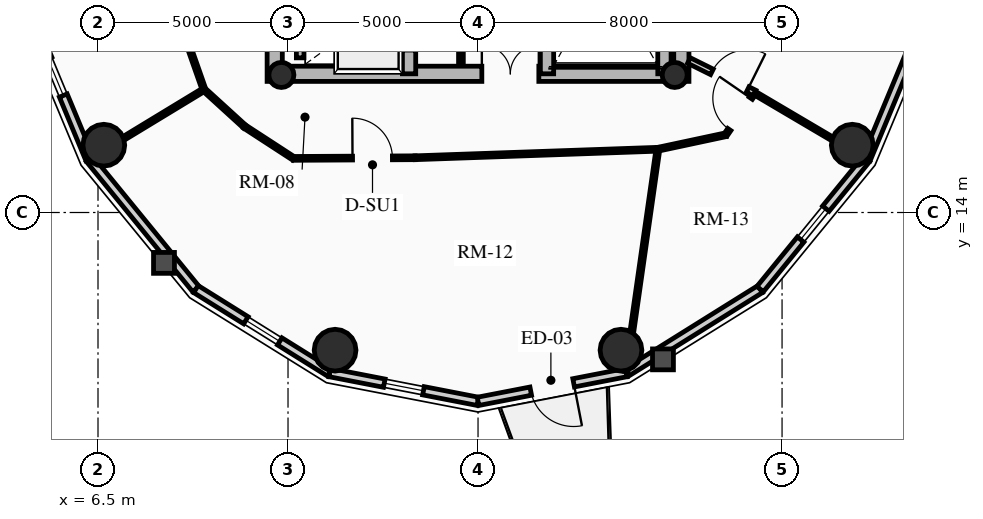
"""IFC4 building model, lengths in metres.
Left out: names, types, materials, properties, quantities, classifications, styles, units other than length and angle.
Written with IfcOpenShell. Run it as: python <this file> out.ifc"""

import sys

from ifc_helpers import new_model, si_unit, direction, frame, frame_2d, origin, origin_2d, place, context, subcontext, project, spatial, rectangle, circle, hollow_circle, extrude, source, transform, mapped, element, fill, save


model = new_model("IFC4")
c1 = context("Model", 3, precision=1e-05, world=origin(), true_north=direction((0.0, 1.0)))
c2 = subcontext(c1, "Body", "Model", "MODEL_VIEW")
j1 = project(units=[si_unit("LENGTHUNIT", "METRE"), si_unit("PLANEANGLEUNIT", "RADIAN")], contexts=[c1])
p1 = place(None, origin())
s1 = spatial("IfcSite", under=j1, at=p1, CompositionType="ELEMENT")
p2 = place(p1, origin())
s2 = spatial("IfcBuilding", under=s1, at=p2, CompositionType="ELEMENT")
p3 = place(p2, frame((0.0, 0.0, 199.57)))
s3 = spatial("IfcBuildingStorey", under=s2, at=p3, CompositionType="ELEMENT", Elevation=199.57)
for number, where, z_axis, x_axis in (
    (1, (11.15, 17.45, 0.0), (0.0, 0.0, 1.0), (0.0, 1.0, 0.0)),
    (2, (21.85, 17.45, 0.0), (0.0, 0.0, 1.0), (0.0, 1.0, 0.0)),
):
    element("IfcWall", number, at=place(p3, frame(where, z_axis=z_axis, x_axis=x_axis)), inside=s3, PredefinedType="SHEAR", context=c2, shape_type="SweptSolid", body=[
        extrude(rectangle(XDim=14.1, YDim=0.4, at=frame_2d((7.05, 0.0))), origin(), (0.0, 0.0, 1.0), 2.91),
    ])
p4 = place(p3, frame((11.15, 17.65, 0.0), z_axis=(0.0, 0.0, 1.0), x_axis=(1.0, 0.0, 0.0)))
e3 = element("IfcWall", 3, at=p4, inside=s3, PredefinedType="SHEAR", context=c2, shape_type="SweptSolid", body=[
    extrude(rectangle(XDim=10.7, YDim=0.4, at=frame_2d((5.35, 0.0))), origin(), (0.0, 0.0, 1.0), 2.91),
])
m1 = source(origin(), c2, "Body", "SweptSolid", [
    extrude(rectangle(XDim=1.5, YDim=2.02, at=frame_2d((0.75, 1.01))), frame((0.0, 0.21, 0.0), z_axis=(0.0, -1.0, 0.0), x_axis=(1.0, 0.0, 0.0)), (0.0, 0.0, 1.0), 0.42),
])
p5 = place(p4, frame((5.45, 0.0, 0.0)))
e4 = element("IfcOpeningElement", 4, at=p5, cuts=e3, PredefinedType="OPENING", context=c2, shape_type="MappedRepresentation", body=[
    mapped(m1, transform((0.0, 0.0, 0.0), x_axis=(1.0, 0.0, 0.0), y_axis=(0.0, 1.0, 0.0), z_axis=(0.0, 0.0, 1.0), scale=1.0)),
])
p6 = place(p3, frame((14.685, 17.65, 0.0), z_axis=(0.0, 0.0, 1.0), x_axis=(0.0, 1.0, 0.0)))
e5 = element("IfcWall", 5, at=p6, inside=s3, PredefinedType="SHEAR", context=c2, shape_type="SweptSolid", body=[
    extrude(rectangle(XDim=13.7, YDim=0.35, at=frame_2d((6.85, 0.0))), origin(), (0.0, 0.0, 1.0), 2.91),
])
m2 = source(origin(), c2, "Body", "SweptSolid", [
    extrude(rectangle(XDim=1.1, YDim=2.015, at=frame_2d((0.55, 1.007))), frame((0.0, 0.185, 0.0), z_axis=(0.0, -1.0, 0.0), x_axis=(1.0, 0.0, 0.0)), (0.0, 0.0, 1.0), 0.37),
])
p7 = place(p6, frame((4.85, 0.0, 0.0)))
e6 = element("IfcOpeningElement", 6, at=p7, cuts=e5, PredefinedType="OPENING", context=c2, shape_type="MappedRepresentation", body=[
    mapped(m2, transform((0.0, 0.0, 0.0), x_axis=(1.0, 0.0, 0.0), y_axis=(0.0, 1.0, 0.0), z_axis=(0.0, 0.0, 1.0), scale=1.0)),
])
p8 = place(p6, frame((0.625, 0.0, 0.0)))
e7 = element("IfcOpeningElement", 7, at=p8, cuts=e5, PredefinedType="OPENING", context=c2, shape_type="MappedRepresentation", body=[
    mapped(m2, transform((0.0, 0.0, 0.0), x_axis=(1.0, 0.0, 0.0), y_axis=(0.0, 1.0, 0.0), z_axis=(0.0, 0.0, 1.0), scale=1.0)),
])
p9 = place(p6, frame((2.625, 0.0, 0.0)))
e8 = element("IfcOpeningElement", 8, at=p9, cuts=e5, PredefinedType="OPENING", context=c2, shape_type="MappedRepresentation", body=[
    mapped(m2, transform((0.0, 0.0, 0.0), x_axis=(1.0, 0.0, 0.0), y_axis=(0.0, 1.0, 0.0), z_axis=(0.0, 0.0, 1.0), scale=1.0)),
])
m3 = source(origin(), c2, "Body", "SweptSolid", [
    extrude(rectangle(XDim=1.15, YDim=2.02, at=frame_2d((0.575, 1.01))), frame((0.0, 0.185, 0.0), z_axis=(0.0, -1.0, 0.0), x_axis=(1.0, 0.0, 0.0)), (0.0, 0.0, 1.0), 0.37),
])
p10 = place(p6, frame((7.27, 0.0, 0.0)))
e9 = element("IfcOpeningElement", 9, at=p10, cuts=e5, PredefinedType="OPENING", context=c2, shape_type="MappedRepresentation", body=[
    mapped(m3, transform((0.0, 0.0, 0.0), x_axis=(1.0, 0.0, 0.0), y_axis=(0.0, 1.0, 0.0), z_axis=(0.0, 0.0, 1.0), scale=1.0)),
])
p11 = place(p3, frame((18.315, 17.65, 0.0), z_axis=(0.0, 0.0, 1.0), x_axis=(0.0, 1.0, 0.0)))
e10 = element("IfcWall", 10, at=p11, inside=s3, PredefinedType="SHEAR", context=c2, shape_type="SweptSolid", body=[
    extrude(rectangle(XDim=9.6, YDim=0.35, at=frame_2d((4.8, 0.0))), origin(), (0.0, 0.0, 1.0), 2.91),
])
p12 = place(p11, frame((5.28, 0.0, 0.0)))
e11 = element("IfcOpeningElement", 11, at=p12, cuts=e10, PredefinedType="OPENING", context=c2, shape_type="MappedRepresentation", body=[
    mapped(m3, transform((0.0, 0.0, 0.0), x_axis=(1.0, 0.0, 0.0), y_axis=(0.0, 1.0, 0.0), z_axis=(0.0, 0.0, 1.0), scale=1.0)),
])
p13 = place(p3, frame((21.405, 17.65, 0.0), z_axis=(0.0, 0.0, 1.0), x_axis=(0.0, 1.0, 0.0)))
e12 = element("IfcWall", 12, at=p13, inside=s3, PredefinedType="SHEAR", context=c2, shape_type="SweptSolid", body=[
    extrude(rectangle(XDim=6.695, YDim=0.35, at=frame_2d((3.348, 0.0))), origin(), (0.0, 0.0, 1.0), 2.91),
])
for number, where, z_axis, x_axis in (
    (13, (11.325, 17.62, 0.0), (0.0, 0.0, 1.0), (1.0, 0.0, 0.0)),
    (14, (21.675, 17.62, 0.0), (0.0, 0.0, 1.0), (1.0, 0.0, 0.0)),
):
    element("IfcColumn", number, at=place(p3, frame(where, z_axis=z_axis, x_axis=x_axis)), inside=s3, PredefinedType="COLUMN", context=c2, shape_type="SweptSolid", body=[
        extrude(hollow_circle(Radius=0.33, WallThickness=0.025, at=origin_2d()), origin(), (0.0, 0.0, 1.0), 2.91),
    ])
for number, where, z_axis, x_axis in (
    (15, (6.653, 15.771, 0.0), (0.0, 0.0, 1.0), (1.0, 0.0, 0.0)),
    (16, (12.739, 10.377, 0.0), (0.0, 0.0, 1.0), (1.0, 0.0, 0.0)),
    (17, (20.261, 10.377, 0.0), (0.0, 0.0, 1.0), (1.0, 0.0, 0.0)),
    (18, (26.347, 15.771, 0.0), (0.0, 0.0, 1.0), (1.0, 0.0, 0.0)),
):
    element("IfcColumn", number, at=place(p3, frame(where, z_axis=z_axis, x_axis=x_axis)), inside=s3, PredefinedType="USERDEFINED", context=c2, shape_type="SweptSolid", body=[
        extrude(circle(Radius=0.55, at=origin_2d()), origin(), (0.0, 0.0, 1.0), 2.91),
    ])
p14 = place(p3, frame((6.282, 15.407, 0.0), z_axis=(0.0, 0.0, 1.0), x_axis=(-0.384036305194, 0.923317993052, 0.0)))
e19 = element("IfcWall", 19, at=p14, inside=s3, PredefinedType="SOLIDWALL", context=c2, shape_type="SweptSolid", body=[
    extrude(rectangle(XDim=4.671, YDim=0.22, at=frame_2d((2.335, 0.0))), origin(), (0.0, 0.0, 1.0), 2.322),
])
m4 = source(origin(), c2, "Body", "SweptSolid", [
    extrude(rectangle(XDim=1.05, YDim=1.3, at=frame_2d((0.525, 0.65))), frame((0.0, 0.12, 0.0), z_axis=(0.0, -1.0, 0.0), x_axis=(1.0, 0.0, 0.0)), (0.0, 0.0, 1.0), 0.24),
])
p15 = place(p14, frame((1.81, 0.0, 0.65)))
e20 = element("IfcOpeningElement", 20, at=p15, cuts=e19, PredefinedType="OPENING", context=c2, shape_type="MappedRepresentation", body=[
    mapped(m4, transform((0.0, 0.0, 0.0), x_axis=(1.0, 0.0, 0.0), y_axis=(0.0, 1.0, 0.0), z_axis=(0.0, 0.0, 1.0), scale=1.0)),
])
p16 = place(p3, frame((9.076, 11.985, 0.0), z_axis=(0.0, 0.0, 1.0), x_axis=(-0.632467166636, 0.774587169483, 0.0)))
e21 = element("IfcWall", 21, at=p16, inside=s3, PredefinedType="SOLIDWALL", context=c2, shape_type="SweptSolid", body=[
    extrude(rectangle(XDim=4.418, YDim=0.22, at=frame_2d((2.209, 0.0))), origin(), (0.0, 0.0, 1.0), 2.322),
])
p17 = place(p3, frame((12.597, 9.787, 0.0), z_axis=(0.0, 0.0, 1.0), x_axis=(-0.848318713376, 0.529485939886, 0.0)))
e22 = element("IfcWall", 22, at=p17, inside=s3, PredefinedType="SOLIDWALL", context=c2, shape_type="SweptSolid", body=[
    extrude(rectangle(XDim=4.15, YDim=0.22, at=frame_2d((2.075, 0.0))), origin(), (0.0, 0.0, 1.0), 2.322),
])
p18 = place(p17, frame((1.55, 0.0, 0.65)))
e23 = element("IfcOpeningElement", 23, at=p18, cuts=e22, PredefinedType="OPENING", context=c2, shape_type="MappedRepresentation", body=[
    mapped(m4, transform((0.0, 0.0, 0.0), x_axis=(1.0, 0.0, 0.0), y_axis=(0.0, 1.0, 0.0), z_axis=(0.0, 0.0, 1.0), scale=1.0)),
])
p19 = place(p3, frame((16.5, 9.03, 0.0), z_axis=(0.0, 0.0, 1.0), x_axis=(-0.981700307484, 0.190432419211, 0.0)))
e24 = element("IfcWall", 24, at=p19, inside=s3, PredefinedType="SOLIDWALL", context=c2, shape_type="SweptSolid", body=[
    extrude(rectangle(XDim=3.976, YDim=0.22, at=frame_2d((1.988, 0.0))), origin(), (0.0, 0.0, 1.0), 2.322),
])
p20 = place(p19, frame((1.463, 0.0, 0.65)))
e25 = element("IfcOpeningElement", 25, at=p20, cuts=e24, PredefinedType="OPENING", context=c2, shape_type="MappedRepresentation", body=[
    mapped(m4, transform((0.0, 0.0, 0.0), x_axis=(1.0, 0.0, 0.0), y_axis=(0.0, 1.0, 0.0), z_axis=(0.0, 0.0, 1.0), scale=1.0)),
])
p21 = place(p3, frame((20.403, 9.787, 0.0), z_axis=(0.0, 0.0, 1.0), x_axis=(-0.981700307484, -0.190432419211, 0.0)))
e26 = element("IfcWall", 26, at=p21, inside=s3, PredefinedType="SOLIDWALL", context=c2, shape_type="SweptSolid", body=[
    extrude(rectangle(XDim=3.976, YDim=0.22, at=frame_2d((1.988, 0.0))), origin(), (0.0, 0.0, 1.0), 2.322),
])
m5 = source(origin(), c2, "Body", "SweptSolid", [
    extrude(rectangle(XDim=1.15, YDim=2.005, at=frame_2d((0.575, 1.002))), frame((0.0, 0.12, 0.0), z_axis=(0.0, -1.0, 0.0), x_axis=(1.0, 0.0, 0.0)), (0.0, 0.0, 1.0), 0.24),
])
p22 = place(p21, frame((1.413, 0.0, 0.0)))
e27 = element("IfcOpeningElement", 27, at=p22, cuts=e26, PredefinedType="OPENING", context=c2, shape_type="MappedRepresentation", body=[
    mapped(m5, transform((0.0, 0.0, 0.0), x_axis=(1.0, 0.0, 0.0), y_axis=(0.0, 1.0, 0.0), z_axis=(0.0, 0.0, 1.0), scale=1.0)),
])
p23 = place(p3, frame((23.924, 11.985, 0.0), z_axis=(0.0, 0.0, 1.0), x_axis=(-0.848318713376, -0.529485939886, 0.0)))
e28 = element("IfcWall", 28, at=p23, inside=s3, PredefinedType="SOLIDWALL", context=c2, shape_type="SweptSolid", body=[
    extrude(rectangle(XDim=4.15, YDim=0.22, at=frame_2d((2.075, 0.0))), origin(), (0.0, 0.0, 1.0), 2.322),
])
p24 = place(p3, frame((26.718, 15.407, 0.0), z_axis=(0.0, 0.0, 1.0), x_axis=(-0.632467166636, -0.774587169483, 0.0)))
e29 = element("IfcWall", 29, at=p24, inside=s3, PredefinedType="SOLIDWALL", context=c2, shape_type="SweptSolid", body=[
    extrude(rectangle(XDim=4.418, YDim=0.22, at=frame_2d((2.209, 0.0))), origin(), (0.0, 0.0, 1.0), 2.322),
])
p25 = place(p24, frame((1.684, 0.0, 0.65)))
e30 = element("IfcOpeningElement", 30, at=p25, cuts=e29, PredefinedType="OPENING", context=c2, shape_type="MappedRepresentation", body=[
    mapped(m4, transform((0.0, 0.0, 0.0), x_axis=(1.0, 0.0, 0.0), y_axis=(0.0, 1.0, 0.0), z_axis=(0.0, 0.0, 1.0), scale=1.0)),
])
p26 = place(p3, frame((28.512, 19.719, 0.0), z_axis=(0.0, 0.0, 1.0), x_axis=(-0.384036305194, -0.923317993052, 0.0)))
e31 = element("IfcWall", 31, at=p26, inside=s3, PredefinedType="SOLIDWALL", context=c2, shape_type="SweptSolid", body=[
    extrude(rectangle(XDim=4.671, YDim=0.22, at=frame_2d((2.335, 0.0))), origin(), (0.0, 0.0, 1.0), 2.322),
])
p27 = place(p3, frame((11.82, 18.07, 0.0), z_axis=(0.0, 0.0, 1.0), x_axis=(0.0, 1.0, 0.0)))
e32 = element("IfcWall", 32, at=p27, inside=s3, PredefinedType="SHEAR", context=c2, shape_type="SweptSolid", body=[
    extrude(rectangle(XDim=1.635, YDim=0.2, at=frame_2d((0.817, 0.0))), origin(), (0.0, 0.0, 1.0), 2.91),
])
p28 = place(p3, frame((16.05, 17.92, 0.0), z_axis=(0.0, 0.0, 1.0), x_axis=(0.0, 1.0, 0.0)))
e33 = element("IfcWall", 33, at=p28, inside=s3, PredefinedType="PARTITIONING", context=c2, shape_type="SweptSolid", body=[
    extrude(rectangle(XDim=1.8, YDim=0.125, at=frame_2d((0.9, 0.0))), origin(), (0.0, 0.0, 1.0), 2.685),
])
m6 = source(origin(), c2, "Body", "SweptSolid", [
    extrude(rectangle(XDim=0.9, YDim=2.005, at=frame_2d((0.45, 1.002))), frame((0.0, 0.073, 0.0), z_axis=(0.0, -1.0, 0.0), x_axis=(1.0, 0.0, 0.0)), (0.0, 0.0, 1.0), 0.145),
])
p29 = place(p28, frame((0.42, 0.0, 0.0)))
e34 = element("IfcOpeningElement", 34, at=p29, cuts=e33, PredefinedType="OPENING", context=c2, shape_type="MappedRepresentation", body=[
    mapped(m6, transform((0.0, 0.0, 0.0), x_axis=(1.0, 0.0, 0.0), y_axis=(0.0, 1.0, 0.0), z_axis=(0.0, 0.0, 1.0), scale=1.0)),
])
p30 = place(p3, frame((8.832, 18.534, 0.0), z_axis=(0.0, 0.0, 1.0), x_axis=(0.332031819657, -0.943268186008, 0.0)))
e35 = element("IfcWall", 35, at=p30, inside=s3, PredefinedType="MOVABLE", context=c2, shape_type="SweptSolid", body=[
    extrude(rectangle(XDim=1.377, YDim=0.1, at=frame_2d((0.688, 0.0))), origin(), (0.0, 0.0, 1.0), 2.255),
])
p31 = place(p3, frame((9.289, 17.235, 0.0), z_axis=(0.0, 0.0, 1.0), x_axis=(0.739015164946, -0.673688790155, 0.0)))
e36 = element("IfcWall", 36, at=p31, inside=s3, PredefinedType="MOVABLE", context=c2, shape_type="SweptSolid", body=[
    extrude(rectangle(XDim=1.446, YDim=0.1, at=frame_2d((0.723, 0.0))), origin(), (0.0, 0.0, 1.0), 2.322),
])
p32 = place(p3, frame((10.358, 16.26, 0.0), z_axis=(0.0, 0.0, 1.0), x_axis=(0.838265397059, -0.545262435983, 0.0)))
e37 = element("IfcWall", 37, at=p32, inside=s3, PredefinedType="MOVABLE", context=c2, shape_type="SweptSolid", body=[
    extrude(rectangle(XDim=1.534, YDim=0.1, at=frame_2d((0.767, 0.0))), origin(), (0.0, 0.0, 1.0), 2.255),
])
p33 = place(p3, frame((11.644, 15.424, 0.0), z_axis=(0.0, 0.0, 1.0), x_axis=(0.999986552511, 0.005186019339, 0.0)))
e38 = element("IfcWall", 38, at=p33, inside=s3, PredefinedType="MOVABLE", context=c2, shape_type="SweptSolid", body=[
    extrude(rectangle(XDim=3.201, YDim=0.1, at=frame_2d((1.601, 0.0))), origin(), (0.0, 0.0, 1.0), 2.322),
])
m7 = source(origin(), c2, "Body", "SweptSolid", [
    extrude(rectangle(XDim=1.05, YDim=2.015, at=frame_2d((0.525, 1.007))), frame((0.0, 0.06, 0.0), z_axis=(0.0, -1.0, 0.0), x_axis=(1.0, 0.0, 0.0)), (0.0, 0.0, 1.0), 0.12),
])
p34 = place(p33, frame((1.553, 0.0, 0.0)))
e39 = element("IfcOpeningElement", 39, at=p34, cuts=e38, PredefinedType="OPENING", context=c2, shape_type="MappedRepresentation", body=[
    mapped(m7, transform((0.0, 0.0, 0.0), x_axis=(1.0, 0.0, 0.0), y_axis=(0.0, 1.0, 0.0), z_axis=(0.0, 0.0, 1.0), scale=1.0)),
])
p35 = place(p3, frame((14.845, 15.441, 0.0), z_axis=(0.0, 0.0, 1.0), x_axis=(0.99938794868, 0.034981824334, 0.0)))
e40 = element("IfcWall", 40, at=p35, inside=s3, PredefinedType="MOVABLE", context=c2, shape_type="SweptSolid", body=[
    extrude(rectangle(XDim=6.393, YDim=0.1, at=frame_2d((3.196, 0.0))), origin(), (0.0, 0.0, 1.0), 2.255),
])
p36 = place(p3, frame((21.234, 15.664, 0.0), z_axis=(0.0, 0.0, 1.0), x_axis=(0.977931581182, 0.208925399431, 0.0)))
e41 = element("IfcWall", 41, at=p36, inside=s3, PredefinedType="MOVABLE", context=c2, shape_type="SweptSolid", body=[
    extrude(rectangle(XDim=1.823, YDim=0.1, at=frame_2d((0.912, 0.0))), origin(), (0.0, 0.0, 1.0), 2.255),
])
p37 = place(p3, frame((23.017, 16.045, 0.0), z_axis=(0.0, 0.0, 1.0), x_axis=(0.566660656138, 0.823951273308, 0.0)))
e42 = element("IfcWall", 42, at=p37, inside=s3, PredefinedType="MOVABLE", context=c2, shape_type="SweptSolid", body=[
    extrude(rectangle(XDim=1.336, YDim=0.1, at=frame_2d((0.668, 0.0))), origin(), (0.0, 0.0, 1.0), 2.322),
])
m8 = source(origin(), c2, "Body", "SweptSolid", [
    extrude(rectangle(XDim=1.0, YDim=2.015, at=frame_2d((0.5, 1.007))), frame((0.0, 0.06, 0.0), z_axis=(0.0, -1.0, 0.0), x_axis=(1.0, 0.0, 0.0)), (0.0, 0.0, 1.0), 0.12),
])
p38 = place(p37, frame((0.168, 0.0, 0.0)))
e43 = element("IfcOpeningElement", 43, at=p38, cuts=e42, PredefinedType="OPENING", context=c2, shape_type="MappedRepresentation", body=[
    mapped(m8, transform((0.0, 0.0, 0.0), x_axis=(1.0, 0.0, 0.0), y_axis=(0.0, 1.0, 0.0), z_axis=(0.0, 0.0, 1.0), scale=1.0)),
])
p39 = place(p3, frame((9.289, 17.235, 0.0), z_axis=(0.0, 0.0, 1.0), x_axis=(-0.854741081983, -0.519054604806, 0.0)))
e44 = element("IfcWall", 44, at=p39, inside=s3, PredefinedType="MOVABLE", context=c2, shape_type="SweptSolid", body=[
    extrude(rectangle(XDim=3.499, YDim=0.1, at=frame_2d((1.75, 0.0))), origin(), (0.0, 0.0, 1.0), 2.322),
])
p40 = place(p3, frame((21.234, 15.664, 0.0), z_axis=(0.0, 0.0, 1.0), x_axis=(-0.141467563045, -0.989942891588, 0.0)))
e45 = element("IfcWall", 45, at=p40, inside=s3, PredefinedType="MOVABLE", context=c2, shape_type="SweptSolid", body=[
    extrude(rectangle(XDim=5.918, YDim=0.1, at=frame_2d((2.959, 0.0))), origin(), (0.0, 0.0, 1.0), 2.322),
])
p41 = place(p3, frame((23.774, 17.146, 0.0), z_axis=(0.0, 0.0, 1.0), x_axis=(0.861296601099, -0.508102514198, 0.0)))
e46 = element("IfcWall", 46, at=p41, inside=s3, PredefinedType="MOVABLE", context=c2, shape_type="SweptSolid", body=[
    extrude(rectangle(XDim=3.399, YDim=0.1, at=frame_2d((1.7, 0.0))), origin(), (0.0, 0.0, 1.0), 2.322),
])
p42 = place(p3, frame((22.05, 18.0, 0.0), z_axis=(0.0, 0.0, 1.0), x_axis=(0.896045848613, -0.443961526692, 0.0)))
e47 = element("IfcWall", 47, at=p42, inside=s3, PredefinedType="PARTITIONING", context=c2, shape_type="SweptSolid", body=[
    extrude(rectangle(XDim=1.924, YDim=0.16, at=frame_2d((0.962, 0.0))), origin(), (0.0, 0.0, 1.0), 2.255),
])
m9 = source(origin(), c2, "Body", "SweptSolid", [
    extrude(rectangle(XDim=1.05, YDim=2.015, at=frame_2d((0.525, 1.007))), frame((0.0, 0.09, 0.0), z_axis=(0.0, -1.0, 0.0), x_axis=(1.0, 0.0, 0.0)), (0.0, 0.0, 1.0), 0.18),
])
p43 = place(p42, frame((0.674, 0.0, 0.0)))
e48 = element("IfcOpeningElement", 48, at=p43, cuts=e47, PredefinedType="OPENING", context=c2, shape_type="MappedRepresentation", body=[
    mapped(m9, transform((0.0, 0.0, 0.0), x_axis=(1.0, 0.0, 0.0), y_axis=(0.0, 1.0, 0.0), z_axis=(0.0, 0.0, 1.0), scale=1.0)),
])
m10 = source(origin(), c2, "Body", "SweptSolid", [
    extrude(rectangle(XDim=1.05, YDim=1.3, at=frame_2d((0.525, 0.65))), frame((0.0, 0.03, 0.0), z_axis=(0.0, -1.0, 0.0), x_axis=(1.0, 0.0, 0.0)), (0.0, 0.0, 1.0), 0.06),
])
p44 = place(p15, origin())
e49 = element("IfcWindow", 49, at=p44, inside=s3, PartitioningType="SINGLE_PANEL", PredefinedType="WINDOW", context=c2, shape_type="MappedRepresentation", body=[
    mapped(m10, transform((0.0, 0.0, 0.0), x_axis=(1.0, 0.0, 0.0), y_axis=(0.0, 1.0, 0.0), z_axis=(0.0, 0.0, 1.0), scale=1.0)),
])
fill(e20, e49)
p45 = place(p18, origin())
e50 = element("IfcWindow", 50, at=p45, inside=s3, PartitioningType="SINGLE_PANEL", PredefinedType="WINDOW", context=c2, shape_type="MappedRepresentation", body=[
    mapped(m10, transform((0.0, 0.0, 0.0), x_axis=(1.0, 0.0, 0.0), y_axis=(0.0, 1.0, 0.0), z_axis=(0.0, 0.0, 1.0), scale=1.0)),
])
fill(e23, e50)
p46 = place(p20, origin())
e51 = element("IfcWindow", 51, at=p46, inside=s3, PartitioningType="SINGLE_PANEL", PredefinedType="WINDOW", context=c2, shape_type="MappedRepresentation", body=[
    mapped(m10, transform((0.0, 0.0, 0.0), x_axis=(1.0, 0.0, 0.0), y_axis=(0.0, 1.0, 0.0), z_axis=(0.0, 0.0, 1.0), scale=1.0)),
])
fill(e25, e51)
m11 = source(origin(), c2, "Body", "SweptSolid", [
    extrude(rectangle(XDim=1.15, YDim=2.005, at=frame_2d((0.575, 1.002))), frame((0.0, 0.025, 0.0), z_axis=(0.0, -1.0, 0.0), x_axis=(1.0, 0.0, 0.0)), (0.0, 0.0, 1.0), 0.05),
])
p47 = place(p22, origin())
e52 = element("IfcDoor", 52, at=p47, inside=s3, OperationType="SINGLE_SWING_LEFT", PredefinedType="DOOR", context=c2, shape_type="MappedRepresentation", body=[
    mapped(m11, transform((0.0, 0.0, 0.0), x_axis=(1.0, 0.0, 0.0), y_axis=(0.0, 1.0, 0.0), z_axis=(0.0, 0.0, 1.0), scale=1.0)),
])
fill(e27, e52)
p48 = place(p25, origin())
e53 = element("IfcWindow", 53, at=p48, inside=s3, PartitioningType="SINGLE_PANEL", PredefinedType="WINDOW", context=c2, shape_type="MappedRepresentation", body=[
    mapped(m10, transform((0.0, 0.0, 0.0), x_axis=(1.0, 0.0, 0.0), y_axis=(0.0, 1.0, 0.0), z_axis=(0.0, 0.0, 1.0), scale=1.0)),
])
fill(e30, e53)
m12 = source(origin(), c2, "Body", "SweptSolid", [
    extrude(rectangle(XDim=1.5, YDim=2.02, at=frame_2d((0.75, 1.01))), frame((0.0, 0.025, 0.0), z_axis=(0.0, -1.0, 0.0), x_axis=(1.0, 0.0, 0.0)), (0.0, 0.0, 1.0), 0.05),
])
p49 = place(p5, origin())
e54 = element("IfcDoor", 54, at=p49, inside=s3, OperationType="DOUBLE_DOOR_SINGLE_SWING", PredefinedType="DOOR", context=c2, shape_type="MappedRepresentation", body=[
    mapped(m12, transform((0.0, 0.0, 0.0), x_axis=(1.0, 0.0, 0.0), y_axis=(0.0, 1.0, 0.0), z_axis=(0.0, 0.0, 1.0), scale=1.0)),
])
fill(e4, e54)
m13 = source(origin(), c2, "Body", "SweptSolid", [
    extrude(rectangle(XDim=1.05, YDim=2.015, at=frame_2d((0.525, 1.007))), frame((0.0, 0.025, 0.0), z_axis=(0.0, -1.0, 0.0), x_axis=(1.0, 0.0, 0.0)), (0.0, 0.0, 1.0), 0.05),
])
p50 = place(p43, origin())
e55 = element("IfcDoor", 55, at=p50, inside=s3, OperationType="SINGLE_SWING_RIGHT", PredefinedType="DOOR", context=c2, shape_type="MappedRepresentation", body=[
    mapped(m13, transform((0.0, 0.0, 0.0), x_axis=(1.0, 0.0, 0.0), y_axis=(0.0, 1.0, 0.0), z_axis=(0.0, 0.0, 1.0), scale=1.0)),
])
fill(e48, e55)
p51 = place(p34, origin())
e56 = element("IfcDoor", 56, at=p51, inside=s3, OperationType="SINGLE_SWING_LEFT", PredefinedType="DOOR", context=c2, shape_type="MappedRepresentation", body=[
    mapped(m13, transform((0.0, 0.0, 0.0), x_axis=(1.0, 0.0, 0.0), y_axis=(0.0, 1.0, 0.0), z_axis=(0.0, 0.0, 1.0), scale=1.0)),
])
fill(e39, e56)
m14 = source(origin(), c2, "Body", "SweptSolid", [
    extrude(rectangle(XDim=1.0, YDim=2.015, at=frame_2d((0.5, 1.007))), frame((0.0, 0.025, 0.0), z_axis=(0.0, -1.0, 0.0), x_axis=(1.0, 0.0, 0.0)), (0.0, 0.0, 1.0), 0.05),
])
p52 = place(p38, origin())
e57 = element("IfcDoor", 57, at=p52, inside=s3, OperationType="SINGLE_SWING_RIGHT", PredefinedType="DOOR", context=c2, shape_type="MappedRepresentation", body=[
    mapped(m14, transform((0.0, 0.0, 0.0), x_axis=(1.0, 0.0, 0.0), y_axis=(0.0, 1.0, 0.0), z_axis=(0.0, 0.0, 1.0), scale=1.0)),
])
fill(e43, e57)
save(model, sys.argv[1])
